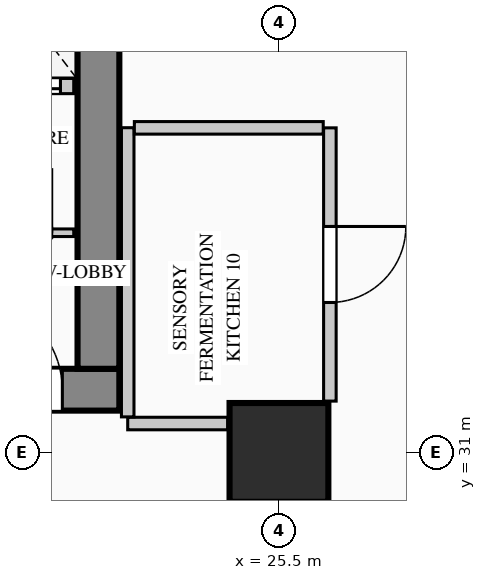
"""IFC4 building model, lengths in metres.
Left out: names, types, materials, properties, quantities, classifications, styles, units other than length and angle.
Written with IfcOpenShell. Run it as: python <this file> out.ifc"""

import sys

from ifc_helpers import new_model, si_unit, direction, frame, frame_2d, origin, origin_2d, place, context, subcontext, project, spatial, rectangle, extrude, element, fill, save


model = new_model("IFC4")
c1 = context("Model", 3, precision=1e-05, world=origin(), true_north=direction((0.0, 1.0)))
c2 = subcontext(c1, "Body", "Model", "MODEL_VIEW")
j1 = project(units=[si_unit("LENGTHUNIT", "METRE"), si_unit("PLANEANGLEUNIT", "RADIAN")], contexts=[c1])
p1 = place(None, origin())
s1 = spatial("IfcSite", under=j1, at=p1, CompositionType="ELEMENT")
p2 = place(p1, origin())
s2 = spatial("IfcBuilding", under=s1, at=p2, CompositionType="ELEMENT")
p3 = place(p2, frame((0.0, 0.0, 84.2)))
s3 = spatial("IfcBuildingStorey", under=s2, at=p3, CompositionType="ELEMENT", Elevation=84.2)
p4 = place(p3, frame((5.45, 31.825, 0.0), z_axis=(0.0, 0.0, 1.0), x_axis=(1.0, 0.0, 0.0)))
e1 = element("IfcWall", 1, at=p4, inside=s3, PredefinedType="SHEAR", context=c2, shape_type="SweptSolid", body=[
    extrude(rectangle(XDim=17.95, YDim=0.55, at=frame_2d((8.975, 0.0))), origin(), (0.0, 0.0, 1.0), 4.4),
])
p5 = place(p4, frame((3.2, 0.0, 0.0)))
e2 = element("IfcOpeningElement", 2, at=p5, cuts=e1, PredefinedType="OPENING", context=c2, shape_type="SweptSolid", body=[
    extrude(rectangle(XDim=1.2, YDim=2.2, at=frame_2d((0.6, 1.1))), frame((0.0, 0.285, 0.0), z_axis=(0.0, -1.0, 0.0), x_axis=(1.0, 0.0, 0.0)), (0.0, 0.0, 1.0), 0.57),
])
p6 = place(p4, frame((7.05, 0.0, 0.0)))
e3 = element("IfcOpeningElement", 3, at=p6, cuts=e1, PredefinedType="OPENING", context=c2, shape_type="SweptSolid", body=[
    extrude(rectangle(XDim=1.2, YDim=2.2, at=frame_2d((0.6, 1.1))), frame((0.0, 0.285, 0.0), z_axis=(0.0, -1.0, 0.0), x_axis=(1.0, 0.0, 0.0)), (0.0, 0.0, 1.0), 0.57),
])
p7 = place(p4, frame((8.9, 0.0, 0.0)))
e4 = element("IfcOpeningElement", 4, at=p7, cuts=e1, PredefinedType="OPENING", context=c2, shape_type="SweptSolid", body=[
    extrude(rectangle(XDim=1.15, YDim=2.2, at=frame_2d((0.575, 1.1))), frame((0.0, 0.285, 0.0), z_axis=(0.0, -1.0, 0.0), x_axis=(1.0, 0.0, 0.0)), (0.0, 0.0, 1.0), 0.57),
])
p8 = place(p4, frame((16.0, 0.0, 0.0)))
e5 = element("IfcOpeningElement", 5, at=p8, cuts=e1, PredefinedType="OPENING", context=c2, shape_type="SweptSolid", body=[
    extrude(rectangle(XDim=1.2, YDim=2.2, at=frame_2d((0.6, 1.1))), frame((0.0, 0.285, 0.0), z_axis=(0.0, -1.0, 0.0), x_axis=(1.0, 0.0, 0.0)), (0.0, 0.0, 1.0), 0.57),
])
p9 = place(p3, frame((23.125, 32.1, 0.0), z_axis=(0.0, 0.0, 1.0), x_axis=(0.0, 1.0, 0.0)))
e6 = element("IfcWall", 6, at=p9, inside=s3, PredefinedType="SHEAR", context=c2, shape_type="SweptSolid", body=[
    extrude(rectangle(XDim=8.3, YDim=0.55, at=frame_2d((4.15, 0.0))), origin(), (0.0, 0.0, 1.0), 4.4),
])
p10 = place(p3, frame((25.5, 31.0, 0.0), z_axis=(0.0, 0.0, 1.0), x_axis=(1.0, 0.0, 0.0)))
e7 = element("IfcColumn", 7, at=p10, inside=s3, PredefinedType="COLUMN", context=c2, shape_type="SweptSolid", body=[
    extrude(rectangle(XDim=1.3, YDim=1.3, at=origin_2d()), origin(), (0.0, 0.0, 1.0), 4.4),
])
p11 = place(p3, frame((21.38, 33.89, 0.0), z_axis=(0.0, 0.0, 1.0), x_axis=(1.0, 0.0, 0.0)))
e8 = element("IfcWall", 8, at=p11, inside=s3, PredefinedType="PARTITIONING", context=c2, shape_type="SweptSolid", body=[
    extrude(rectangle(XDim=1.42, YDim=0.1, at=frame_2d((0.71, 0.0))), origin(), (0.0, 0.0, 1.0), 4.115),
])
p12 = place(p11, frame((0.28, 0.0, 0.0)))
e9 = element("IfcOpeningElement", 9, at=p12, cuts=e8, PredefinedType="OPENING", context=c2, shape_type="SweptSolid", body=[
    extrude(rectangle(XDim=0.85, YDim=2.1, at=frame_2d((0.425, 1.05))), frame((0.0, 0.06, 0.0), z_axis=(0.0, -1.0, 0.0), x_axis=(1.0, 0.0, 0.0)), (0.0, 0.0, 1.0), 0.12),
])
p13 = place(p3, frame((21.3, 35.82, 0.0), z_axis=(0.0, 0.0, 1.0), x_axis=(1.0, 0.0, 0.0)))
e10 = element("IfcWall", 10, at=p13, inside=s3, PredefinedType="PARTITIONING", context=c2, shape_type="SweptSolid", body=[
    extrude(rectangle(XDim=1.5, YDim=0.2, at=frame_2d((0.75, 0.0))), origin(), (0.0, 0.0, 1.0), 4.115),
])
p14 = place(p13, frame((0.145, 0.0, 0.0)))
e11 = element("IfcOpeningElement", 11, at=p14, cuts=e10, PredefinedType="OPENING", context=c2, shape_type="SweptSolid", body=[
    extrude(rectangle(XDim=1.18, YDim=2.25, at=frame_2d((0.59, 1.125))), frame((0.0, 0.11, 0.0), z_axis=(0.0, -1.0, 0.0), x_axis=(1.0, 0.0, 0.0)), (0.0, 0.0, 1.0), 0.22),
])
p15 = place(p3, frame((26.17, 35.27, 0.0), z_axis=(0.0, 0.0, 1.0), x_axis=(0.0, -1.0, 0.0)))
e12 = element("IfcWall", 12, at=p15, inside=s3, PredefinedType="PARTITIONING", context=c2, shape_type="SweptSolid", body=[
    extrude(rectangle(XDim=3.595, YDim=0.165, at=frame_2d((1.797, 0.0))), origin(), (0.0, 0.0, 1.0), 4.115),
])
p16 = place(p15, frame((1.298, 0.0, 0.0)))
e13 = element("IfcOpeningElement", 13, at=p16, cuts=e12, PredefinedType="OPENING", context=c2, shape_type="SweptSolid", body=[
    extrude(rectangle(XDim=1.0, YDim=2.15, at=frame_2d((0.5, 1.075))), frame((0.0, 0.093, 0.0), z_axis=(0.0, -1.0, 0.0), x_axis=(1.0, 0.0, 0.0)), (0.0, 0.0, 1.0), 0.185),
])
p17 = place(p3, frame((24.825, 31.38, 0.0), z_axis=(0.0, 0.0, 1.0), x_axis=(-1.0, 0.0, 0.0)))
e14 = element("IfcWall", 14, at=p17, inside=s3, PredefinedType="PARTITIONING", context=c2, shape_type="SweptSolid", body=[
    extrude(rectangle(XDim=1.315, YDim=0.165, at=frame_2d((0.657, 0.0))), origin(), (0.0, 0.0, 1.0), 4.115),
])
p18 = place(p3, frame((23.51, 31.468, 0.0), z_axis=(0.0, 0.0, 1.0), x_axis=(0.0, 1.0, 0.0)))
e15 = element("IfcWall", 15, at=p18, inside=s3, PredefinedType="PARTITIONING", context=c2, shape_type="SweptSolid", body=[
    extrude(rectangle(XDim=3.804, YDim=0.165, at=frame_2d((1.902, 0.0))), origin(), (0.0, 0.0, 1.0), 4.115),
])
p19 = place(p3, frame((23.597, 35.27, 0.0), z_axis=(0.0, 0.0, 1.0), x_axis=(1.0, 0.0, 0.0)))
e16 = element("IfcWall", 16, at=p19, inside=s3, PredefinedType="PARTITIONING", context=c2, shape_type="SweptSolid", body=[
    extrude(rectangle(XDim=2.485, YDim=0.165, at=frame_2d((1.243, 0.0))), origin(), (0.0, 0.0, 1.0), 4.115),
])
p20 = place(p8, origin())
e17 = element("IfcDoor", 17, at=p20, inside=s3, OperationType="SINGLE_SWING_LEFT", PredefinedType="DOOR", context=c2, shape_type="SweptSolid", body=[
    extrude(rectangle(XDim=1.2, YDim=2.2, at=frame_2d((0.6, 1.1))), frame((0.0, 0.025, 0.0), z_axis=(0.0, -1.0, 0.0), x_axis=(1.0, 0.0, 0.0)), (0.0, 0.0, 1.0), 0.05),
])
fill(e5, e17)
p21 = place(p14, origin())
e18 = element("IfcDoor", 18, at=p21, inside=s3, OperationType="DOUBLE_DOOR_SLIDING", PredefinedType="DOOR", context=c2, shape_type="SweptSolid", body=[
    extrude(rectangle(XDim=1.18, YDim=2.25, at=frame_2d((0.59, 1.125))), frame((0.0, 0.025, 0.0), z_axis=(0.0, -1.0, 0.0), x_axis=(1.0, 0.0, 0.0)), (0.0, 0.0, 1.0), 0.05),
])
fill(e11, e18)
p22 = place(p16, origin())
e19 = element("IfcDoor", 19, at=p22, inside=s3, OperationType="SINGLE_SWING_LEFT", PredefinedType="DOOR", context=c2, shape_type="SweptSolid", body=[
    extrude(rectangle(XDim=1.0, YDim=2.15, at=frame_2d((0.5, 1.075))), frame((0.0, 0.025, 0.0), z_axis=(0.0, -1.0, 0.0), x_axis=(1.0, 0.0, 0.0)), (0.0, 0.0, 1.0), 0.05),
])
fill(e13, e19)
save(model, sys.argv[1])
